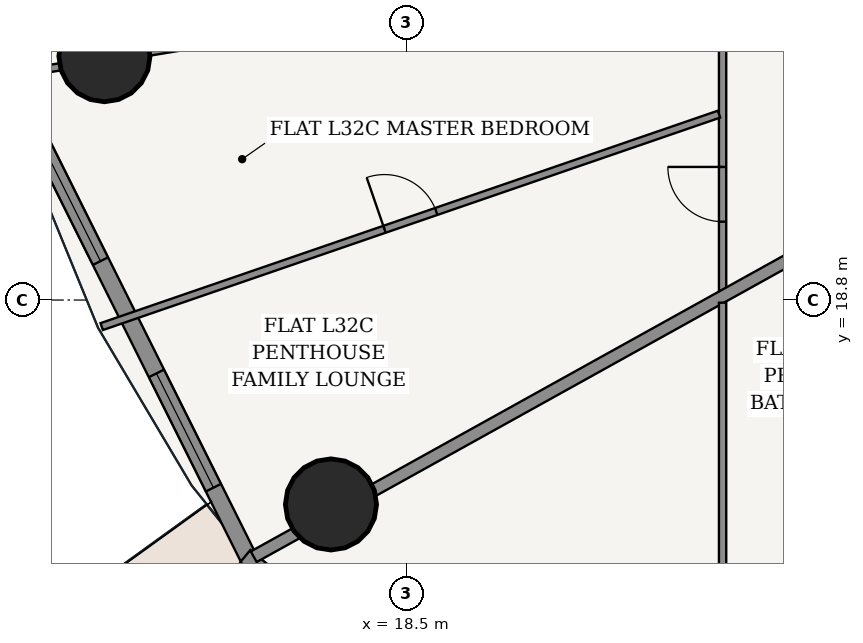
"""IFC4 building model, lengths in metres.
Left out: names, types, materials, properties, quantities, classifications, styles, units other than length and angle.
Written with IfcOpenShell. Run it as: python <this file> out.ifc"""

import sys

from ifc_helpers import new_model, si_unit, direction, frame, frame_2d, origin, origin_2d, place, context, subcontext, project, spatial, rectangle, hollow_circle, extrude, source, transform, mapped, element, fill, save


model = new_model("IFC4")
c1 = context("Model", 3, precision=1e-05, world=origin(), true_north=direction((-0.2419218956, 0.970295726276)))
c2 = subcontext(c1, "Body", "Model", "MODEL_VIEW")
j1 = project(units=[si_unit("LENGTHUNIT", "METRE"), si_unit("PLANEANGLEUNIT", "RADIAN")], contexts=[c1])
p1 = place(None, origin())
s1 = spatial("IfcSite", under=j1, at=p1, CompositionType="ELEMENT")
p2 = place(p1, origin())
s2 = spatial("IfcBuilding", under=s1, at=p2, CompositionType="ELEMENT")
p3 = place(p2, frame((0.0, 0.0, 123.0)))
s3 = spatial("IfcBuildingStorey", under=s2, at=p3, CompositionType="ELEMENT", Elevation=123.0)
for number, where, z_axis, x_axis in (
    (1, (13.529, 22.81, 0.0), (0.0, 0.0, 1.0), (1.0, 0.0, 0.0)),
    (2, (17.255, 15.438, 0.0), (0.0, 0.0, 1.0), (1.0, 0.0, 0.0)),
):
    element("IfcColumn", number, at=place(p3, frame(where, z_axis=z_axis, x_axis=x_axis)), inside=s3, PredefinedType="COLUMN", context=c2, shape_type="SweptSolid", body=[
        extrude(hollow_circle(Radius=0.75, WallThickness=0.045, at=origin_2d()), origin(), (0.0, 0.0, 1.0), 3.6),
    ])
p4 = place(p3, frame((11.905, 22.566, 0.0), z_axis=(0.0, 0.0, 1.0), x_axis=(0.446274562077, -0.894896091869, 0.0)))
e3 = element("IfcWall", 3, at=p4, inside=s3, PredefinedType="SOLIDWALL", context=c2, shape_type="SweptSolid", body=[
    extrude(rectangle(XDim=9.05, YDim=0.28, at=frame_2d((4.525, 0.0))), origin(), (0.0, 0.0, 1.0), 3.325),
])
p5 = place(p4, frame((1.394, 0.0, 0.85)))
e4 = element("IfcOpeningElement", 4, at=p5, cuts=e3, PredefinedType="OPENING", context=c2, shape_type="SweptSolid", body=[
    extrude(rectangle(XDim=2.1, YDim=1.95, at=frame_2d((1.05, 0.975))), frame((0.0, 0.15, 0.0), z_axis=(0.0, -1.0, 0.0), x_axis=(1.0, 0.0, 0.0)), (0.0, 0.0, 1.0), 0.3),
])
p6 = place(p4, frame((5.557, 0.0, 0.85)))
e5 = element("IfcOpeningElement", 5, at=p6, cuts=e3, PredefinedType="OPENING", context=c2, shape_type="SweptSolid", body=[
    extrude(rectangle(XDim=2.1, YDim=1.95, at=frame_2d((1.05, 0.975))), frame((0.0, 0.15, 0.0), z_axis=(0.0, -1.0, 0.0), x_axis=(1.0, 0.0, 0.0)), (0.0, 0.0, 1.0), 0.3),
])
p7 = place(p3, frame((15.846, 14.59, 0.0), z_axis=(0.0, 0.0, 1.0), x_axis=(0.769254958887, -0.638941944333, 0.0)))
e6 = element("IfcWall", 6, at=p7, inside=s3, PredefinedType="SOLIDWALL", context=c2, shape_type="SweptSolid", body=[
    extrude(rectangle(XDim=9.69, YDim=0.26, at=frame_2d((4.845, 0.0))), origin(), (0.0, 0.0, 1.0), 3.325),
])
p8 = place(p7, frame((4.17, 0.0, 0.0)))
e7 = element("IfcOpeningElement", 7, at=p8, cuts=e6, PredefinedType="OPENING", context=c2, shape_type="SweptSolid", body=[
    extrude(rectangle(XDim=1.35, YDim=2.2, at=frame_2d((0.675, 1.1))), frame((0.0, 0.14, 0.0), z_axis=(0.0, -1.0, 0.0), x_axis=(1.0, 0.0, 0.0)), (0.0, 0.0, 1.0), 0.28),
])
p9 = place(p3, frame((23.695, 18.961, 0.0), z_axis=(0.0, 0.0, 1.0), x_axis=(0.0, 1.0, 0.0)))
e8 = element("IfcWall", 8, at=p9, inside=s3, PredefinedType="PARTITIONING", context=c2, shape_type="SweptSolid", body=[
    extrude(rectangle(XDim=15.679, YDim=0.12, at=frame_2d((7.839, 0.0))), origin(), (0.0, 0.0, 1.0), 2.767),
])
p10 = place(p9, frame((7.625, 0.0, 0.0)))
e9 = element("IfcOpeningElement", 9, at=p10, cuts=e8, PredefinedType="OPENING", context=c2, shape_type="SweptSolid", body=[
    extrude(rectangle(XDim=0.9, YDim=2.15, at=frame_2d((0.45, 1.075))), frame((0.0, 0.07, 0.0), z_axis=(0.0, -1.0, 0.0), x_axis=(1.0, 0.0, 0.0)), (0.0, 0.0, 1.0), 0.14),
])
p11 = place(p9, frame((1.128, 0.0, 0.0)))
e10 = element("IfcOpeningElement", 10, at=p11, cuts=e8, PredefinedType="OPENING", context=c2, shape_type="SweptSolid", body=[
    extrude(rectangle(XDim=0.9, YDim=2.15, at=frame_2d((0.45, 1.075))), frame((0.0, 0.07, 0.0), z_axis=(0.0, -1.0, 0.0), x_axis=(1.0, 0.0, 0.0)), (0.0, 0.0, 1.0), 0.14),
])
p12 = place(p3, frame((23.634, 24.426, 0.0), z_axis=(0.0, 0.0, 1.0), x_axis=(-0.986619012175, -0.163042708564, 0.0)))
e11 = element("IfcWall", 11, at=p12, inside=s3, PredefinedType="PARTITIONING", context=c2, shape_type="SweptSolid", body=[
    extrude(rectangle(XDim=11.765, YDim=0.12, at=frame_2d((5.883, 0.0))), origin(), (0.0, 0.0, 1.0), 2.767),
])
p13 = place(p3, frame((23.636, 21.857, 0.0), z_axis=(0.0, 0.0, 1.0), x_axis=(-0.945571197348, -0.325415289661, 0.0)))
e12 = element("IfcWall", 12, at=p13, inside=s3, PredefinedType="PARTITIONING", context=c2, shape_type="SweptSolid", body=[
    extrude(rectangle(XDim=10.737, YDim=0.12, at=frame_2d((5.368, 0.0))), origin(), (0.0, 0.0, 1.0), 2.767),
])
p14 = place(p13, frame((4.918, 0.0, 0.0)))
e13 = element("IfcOpeningElement", 13, at=p14, cuts=e12, PredefinedType="OPENING", context=c2, shape_type="SweptSolid", body=[
    extrude(rectangle(XDim=0.9, YDim=2.15, at=frame_2d((0.45, 1.075))), frame((0.0, 0.07, 0.0), z_axis=(0.0, -1.0, 0.0), x_axis=(1.0, 0.0, 0.0)), (0.0, 0.0, 1.0), 0.14),
])
p15 = place(p3, frame((26.615, 20.48, 0.0), z_axis=(0.0, 0.0, 1.0), x_axis=(-0.874310671773, -0.48536671623, 0.0)))
e14 = element("IfcWall", 14, at=p15, inside=s3, PredefinedType="PARTITIONING", context=c2, shape_type="SweptSolid", body=[
    extrude(rectangle(XDim=12.159, YDim=0.2, at=frame_2d((6.079, 0.0))), origin(), (0.0, 0.0, 1.0), 2.767),
])
p16 = place(p3, frame((23.695, 13.495, 0.0), z_axis=(0.0, 0.0, 1.0), x_axis=(0.0, 1.0, 0.0)))
e15 = element("IfcWall", 15, at=p16, inside=s3, PredefinedType="PARTITIONING", context=c2, shape_type="SweptSolid", body=[
    extrude(rectangle(XDim=5.261, YDim=0.12, at=frame_2d((2.631, 0.0))), origin(), (0.0, 0.0, 1.0), 3.004),
])
m1 = source(origin(), c2, "Body", "SweptSolid", [
    extrude(rectangle(XDim=2.1, YDim=1.95, at=frame_2d((1.05, 0.975))), frame((0.0, 0.03, 0.0), z_axis=(0.0, -1.0, 0.0), x_axis=(1.0, 0.0, 0.0)), (0.0, 0.0, 1.0), 0.06),
])
p17 = place(p5, origin())
e16 = element("IfcWindow", 16, at=p17, inside=s3, PartitioningType="SINGLE_PANEL", PredefinedType="WINDOW", context=c2, shape_type="MappedRepresentation", body=[
    mapped(m1, transform((0.0, 0.0, 0.0), scale=1.0)),
])
fill(e4, e16)
p18 = place(p6, origin())
e17 = element("IfcWindow", 17, at=p18, inside=s3, PartitioningType="SINGLE_PANEL", PredefinedType="WINDOW", context=c2, shape_type="MappedRepresentation", body=[
    mapped(m1, transform((0.0, 0.0, 0.0), scale=1.0)),
])
fill(e5, e17)
m2 = source(origin(), c2, "Body", "SweptSolid", [
    extrude(rectangle(XDim=0.9, YDim=2.15, at=frame_2d((0.45, 1.075))), frame((0.0, 0.025, 0.0), z_axis=(0.0, -1.0, 0.0), x_axis=(1.0, 0.0, 0.0)), (0.0, 0.0, 1.0), 0.05),
])
p19 = place(p11, origin())
e18 = element("IfcDoor", 18, at=p19, inside=s3, OperationType="SINGLE_SWING_RIGHT", PredefinedType="DOOR", context=c2, shape_type="MappedRepresentation", body=[
    mapped(m2, transform((0.0, 0.0, 0.0), scale=1.0)),
])
fill(e10, e18)
p20 = place(p14, frame((0.9, 0.0, 0.0), z_axis=(0.0, 0.0, 1.0), x_axis=(-1.0, 0.0, 0.0)))
e19 = element("IfcDoor", 19, at=p20, inside=s3, OperationType="SINGLE_SWING_LEFT", PredefinedType="DOOR", context=c2, shape_type="MappedRepresentation", body=[
    mapped(m2, transform((0.0, 0.0, 0.0), scale=1.0)),
])
fill(e13, e19)
save(model, sys.argv[1])
